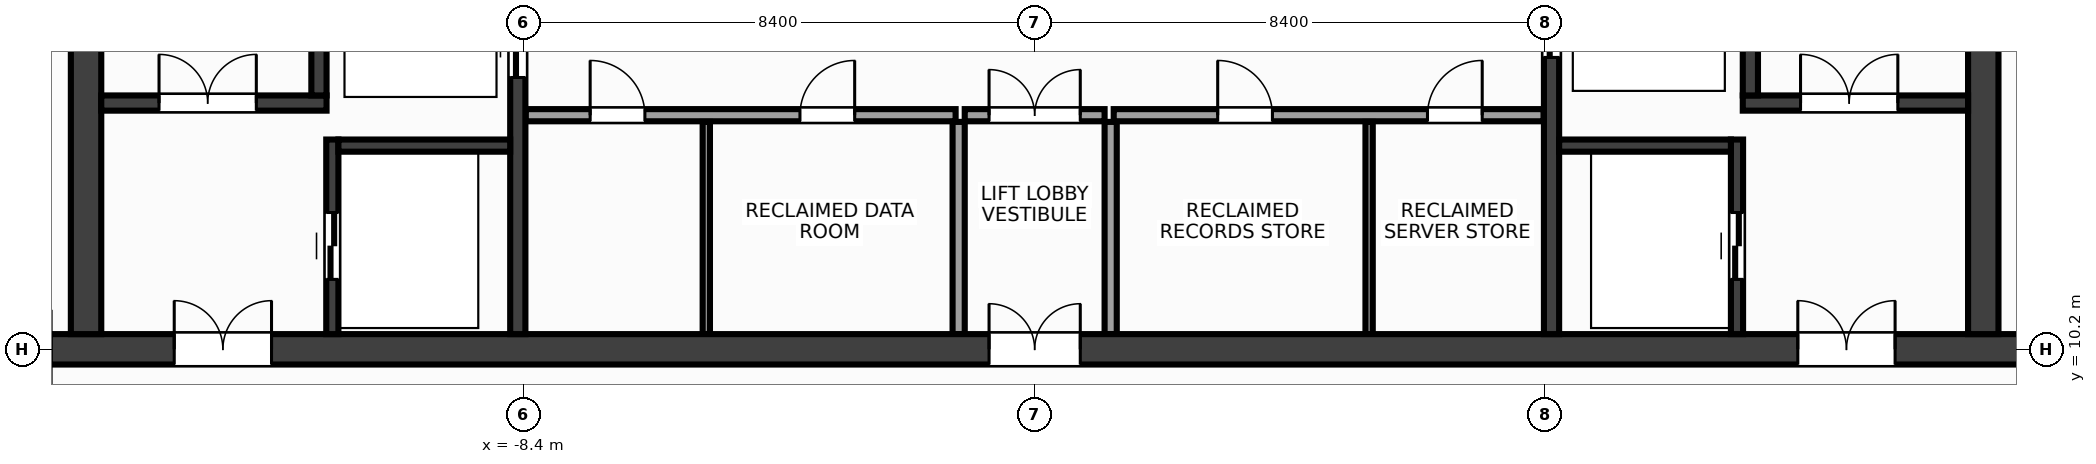
"""IFC4 building model, lengths in metres.
Left out: names, types, materials, properties, quantities, classifications, styles, units other than length and angle.
Written with IfcOpenShell. Run it as: python <this file> out.ifc"""

import sys

from ifc_helpers import new_model, si_unit, direction, frame, frame_2d, origin, place, context, subcontext, project, spatial, rectangle, extrude, source, transform, mapped, element, fill, save


model = new_model("IFC4")
c1 = context("Model", 3, precision=1e-05, world=origin(), true_north=direction((0.0, 1.0)))
c2 = subcontext(c1, "Body", "Model", "MODEL_VIEW")
j1 = project(units=[si_unit("LENGTHUNIT", "METRE"), si_unit("PLANEANGLEUNIT", "RADIAN")], contexts=[c1])
p1 = place(None, origin())
s1 = spatial("IfcSite", under=j1, at=p1, CompositionType="ELEMENT")
p2 = place(p1, origin())
s2 = spatial("IfcBuilding", under=s1, at=p2, CompositionType="ELEMENT")
p3 = place(p2, frame((0.0, 0.0, 286.4)))
s3 = spatial("IfcBuildingStorey", under=s2, at=p3, CompositionType="ELEMENT", Elevation=286.4)
m1 = source(origin(), c2, "Body", "SweptSolid", [
    extrude(rectangle(XDim=32.4, YDim=0.5, at=frame_2d((16.2, 0.0))), origin(), (0.0, 0.0, 1.0), 3.6),
])
p4 = place(p3, frame((-16.2, 10.2, 0.0), z_axis=(0.0, 0.0, 1.0), x_axis=(1.0, 0.0, 0.0)))
e1 = element("IfcWall", 1, at=p4, inside=s3, PredefinedType="SHEAR", context=c2, shape_type="MappedRepresentation", body=[
    mapped(m1, transform((0.0, 0.0, 0.0), x_axis=(1.0, 0.0, 0.0), y_axis=(0.0, 1.0, 0.0), z_axis=(0.0, 0.0, 1.0), scale=1.0)),
])
p5 = place(p4, frame((2.05, 0.0, 0.0)))
e2 = element("IfcOpeningElement", 2, at=p5, cuts=e1, PredefinedType="OPENING", context=c2, shape_type="SweptSolid", body=[
    extrude(rectangle(XDim=1.6, YDim=2.15, at=frame_2d((0.8, 1.075))), frame((0.0, 0.262, 0.0), z_axis=(0.0, -1.0, 0.0), x_axis=(1.0, 0.0, 0.0)), (0.0, 0.0, 1.0), 0.524),
])
p6 = place(p4, frame((28.75, 0.0, 0.0)))
e3 = element("IfcOpeningElement", 3, at=p6, cuts=e1, PredefinedType="OPENING", context=c2, shape_type="SweptSolid", body=[
    extrude(rectangle(XDim=1.6, YDim=2.15, at=frame_2d((0.8, 1.075))), frame((0.0, 0.262, 0.0), z_axis=(0.0, -1.0, 0.0), x_axis=(1.0, 0.0, 0.0)), (0.0, 0.0, 1.0), 0.524),
])
p7 = place(p4, frame((15.45, 0.0, 0.0)))
e4 = element("IfcOpeningElement", 4, at=p7, cuts=e1, PredefinedType="OPENING", context=c2, shape_type="SweptSolid", body=[
    extrude(rectangle(XDim=1.5, YDim=2.2, at=frame_2d((0.75, 1.1))), frame((0.0, 0.262, 0.0), z_axis=(0.0, -1.0, 0.0), x_axis=(1.0, 0.0, 0.0)), (0.0, 0.0, 1.0), 0.524),
])
m2 = source(origin(), c2, "Body", "SweptSolid", [
    extrude(rectangle(XDim=13.1, YDim=0.5, at=frame_2d((6.55, 0.0))), origin(), (0.0, 0.0, 1.0), 3.6),
])
for number, where, z_axis, x_axis in (
    (5, (-15.6, 10.45, 0.0), (0.0, 0.0, 1.0), (0.0, 1.0, 0.0)),
    (6, (15.6, 10.45, 0.0), (0.0, 0.0, 1.0), (0.0, 1.0, 0.0)),
):
    element("IfcWall", number, at=place(p3, frame(where, z_axis=z_axis, x_axis=x_axis)), inside=s3, PredefinedType="SHEAR", context=c2, shape_type="MappedRepresentation", body=[
        mapped(m2, transform((0.0, 0.0, 0.0), x_axis=(1.0, 0.0, 0.0), y_axis=(0.0, 1.0, 0.0), z_axis=(0.0, 0.0, 1.0), scale=1.0)),
    ])
m3 = source(origin(), c2, "Body", "SweptSolid", [
    extrude(rectangle(XDim=13.1, YDim=0.25, at=frame_2d((6.55, 0.0))), origin(), (0.0, 0.0, 1.0), 3.6),
])
p8 = place(p3, frame((-8.5, 10.45, 0.0), z_axis=(0.0, 0.0, 1.0), x_axis=(0.0, 1.0, 0.0)))
e7 = element("IfcWall", 7, at=p8, inside=s3, PredefinedType="SHEAR", context=c2, shape_type="MappedRepresentation", body=[
    mapped(m3, transform((0.0, 0.0, 0.0), x_axis=(1.0, 0.0, 0.0), y_axis=(0.0, 1.0, 0.0), z_axis=(0.0, 0.0, 1.0), scale=1.0)),
])
p9 = place(p8, frame((4.22, 0.0, 0.0)))
e8 = element("IfcOpeningElement", 8, at=p9, cuts=e7, PredefinedType="OPENING", context=c2, shape_type="SweptSolid", body=[
    extrude(rectangle(XDim=1.1, YDim=2.15, at=frame_2d((0.55, 1.075))), frame((0.0, 0.137, 0.0), z_axis=(0.0, -1.0, 0.0), x_axis=(1.0, 0.0, 0.0)), (0.0, 0.0, 1.0), 0.274),
])
p10 = place(p8, frame((6.14, 0.0, 0.0)))
e9 = element("IfcOpeningElement", 9, at=p10, cuts=e7, PredefinedType="OPENING", context=c2, shape_type="SweptSolid", body=[
    extrude(rectangle(XDim=1.1, YDim=2.15, at=frame_2d((0.55, 1.075))), frame((0.0, 0.137, 0.0), z_axis=(0.0, -1.0, 0.0), x_axis=(1.0, 0.0, 0.0)), (0.0, 0.0, 1.0), 0.274),
])
p11 = place(p8, frame((8.06, 0.0, 0.0)))
e10 = element("IfcOpeningElement", 10, at=p11, cuts=e7, PredefinedType="OPENING", context=c2, shape_type="SweptSolid", body=[
    extrude(rectangle(XDim=1.1, YDim=2.15, at=frame_2d((0.55, 1.075))), frame((0.0, 0.137, 0.0), z_axis=(0.0, -1.0, 0.0), x_axis=(1.0, 0.0, 0.0)), (0.0, 0.0, 1.0), 0.274),
])
p12 = place(p3, frame((8.5, 10.45, 0.0), z_axis=(0.0, 0.0, 1.0), x_axis=(0.0, 1.0, 0.0)))
e11 = element("IfcWall", 11, at=p12, inside=s3, PredefinedType="SHEAR", context=c2, shape_type="MappedRepresentation", body=[
    mapped(m3, transform((0.0, 0.0, 0.0), x_axis=(1.0, 0.0, 0.0), y_axis=(0.0, 1.0, 0.0), z_axis=(0.0, 0.0, 1.0), scale=1.0)),
])
p13 = place(p12, frame((4.55, 0.0, 0.0)))
e12 = element("IfcOpeningElement", 12, at=p13, cuts=e11, PredefinedType="OPENING", context=c2, shape_type="SweptSolid", body=[
    extrude(rectangle(XDim=1.1, YDim=2.15, at=frame_2d((0.55, 1.075))), frame((0.0, 0.137, 0.0), z_axis=(0.0, -1.0, 0.0), x_axis=(1.0, 0.0, 0.0)), (0.0, 0.0, 1.0), 0.274),
])
p14 = place(p12, frame((7.1, 0.0, 0.0)))
e13 = element("IfcOpeningElement", 13, at=p14, cuts=e11, PredefinedType="OPENING", context=c2, shape_type="SweptSolid", body=[
    extrude(rectangle(XDim=1.1, YDim=2.15, at=frame_2d((0.55, 1.075))), frame((0.0, 0.137, 0.0), z_axis=(0.0, -1.0, 0.0), x_axis=(1.0, 0.0, 0.0)), (0.0, 0.0, 1.0), 0.274),
])
p15 = place(p12, frame((10.0, 0.0, 0.0)))
e14 = element("IfcOpeningElement", 14, at=p15, cuts=e11, PredefinedType="OPENING", context=c2, shape_type="SweptSolid", body=[
    extrude(rectangle(XDim=0.95, YDim=2.15, at=frame_2d((0.475, 1.075))), frame((0.0, 0.137, 0.0), z_axis=(0.0, -1.0, 0.0), x_axis=(1.0, 0.0, 0.0)), (0.0, 0.0, 1.0), 0.274),
])
m4 = source(origin(), c2, "Body", "SweptSolid", [
    extrude(rectangle(XDim=3.705, YDim=0.25, at=frame_2d((1.853, 0.0))), origin(), (0.0, 0.0, 1.0), 3.6),
])
p16 = place(p3, frame((-15.35, 14.25, 0.0), z_axis=(0.0, 0.0, 1.0), x_axis=(1.0, 0.0, 0.0)))
e15 = element("IfcWall", 15, at=p16, inside=s3, PredefinedType="SHEAR", context=c2, shape_type="MappedRepresentation", body=[
    mapped(m4, transform((0.0, 0.0, 0.0), x_axis=(1.0, 0.0, 0.0), y_axis=(0.0, 1.0, 0.0), z_axis=(0.0, 0.0, 1.0), scale=1.0)),
])
p17 = place(p16, frame((0.95, 0.0, 0.0)))
e16 = element("IfcOpeningElement", 16, at=p17, cuts=e15, PredefinedType="OPENING", context=c2, shape_type="SweptSolid", body=[
    extrude(rectangle(XDim=1.6, YDim=2.15, at=frame_2d((0.8, 1.075))), frame((0.0, 0.137, 0.0), z_axis=(0.0, -1.0, 0.0), x_axis=(1.0, 0.0, 0.0)), (0.0, 0.0, 1.0), 0.274),
])
m5 = source(origin(), c2, "Body", "SweptSolid", [
    extrude(rectangle(XDim=9.175, YDim=0.25, at=frame_2d((4.587, 0.0))), origin(), (0.0, 0.0, 1.0), 3.6),
])
p18 = place(p3, frame((-11.77, 14.375, 0.0), z_axis=(0.0, 0.0, 1.0), x_axis=(0.0, 1.0, 0.0)))
e17 = element("IfcWall", 17, at=p18, inside=s3, PredefinedType="SHEAR", context=c2, shape_type="MappedRepresentation", body=[
    mapped(m5, transform((0.0, 0.0, 0.0), x_axis=(1.0, 0.0, 0.0), y_axis=(0.0, 1.0, 0.0), z_axis=(0.0, 0.0, 1.0), scale=1.0)),
])
p19 = place(p3, frame((11.645, 14.25, 0.0), z_axis=(0.0, 0.0, 1.0), x_axis=(1.0, 0.0, 0.0)))
e18 = element("IfcWall", 18, at=p19, inside=s3, PredefinedType="SHEAR", context=c2, shape_type="MappedRepresentation", body=[
    mapped(m4, transform((0.0, 0.0, 0.0), x_axis=(1.0, 0.0, 0.0), y_axis=(0.0, 1.0, 0.0), z_axis=(0.0, 0.0, 1.0), scale=1.0)),
])
p20 = place(p19, frame((0.95, 0.0, 0.0)))
e19 = element("IfcOpeningElement", 19, at=p20, cuts=e18, PredefinedType="OPENING", context=c2, shape_type="SweptSolid", body=[
    extrude(rectangle(XDim=1.6, YDim=2.15, at=frame_2d((0.8, 1.075))), frame((0.0, 0.137, 0.0), z_axis=(0.0, -1.0, 0.0), x_axis=(1.0, 0.0, 0.0)), (0.0, 0.0, 1.0), 0.274),
])
p21 = place(p3, frame((11.77, 14.375, 0.0), z_axis=(0.0, 0.0, 1.0), x_axis=(0.0, 1.0, 0.0)))
e20 = element("IfcWall", 20, at=p21, inside=s3, PredefinedType="SHEAR", context=c2, shape_type="MappedRepresentation", body=[
    mapped(m5, transform((0.0, 0.0, 0.0), x_axis=(1.0, 0.0, 0.0), y_axis=(0.0, 1.0, 0.0), z_axis=(0.0, 0.0, 1.0), scale=1.0)),
])
m6 = source(origin(), c2, "Body", "SweptSolid", [
    extrude(rectangle(XDim=3.2, YDim=0.2, at=frame_2d((1.6, 0.0))), origin(), (0.0, 0.0, 1.0), 3.6),
])
p22 = place(p3, frame((-11.55, 10.45, 0.0), z_axis=(0.0, 0.0, 1.0), x_axis=(0.0, 1.0, 0.0)))
e21 = element("IfcWall", 21, at=p22, inside=s3, PredefinedType="SHEAR", context=c2, shape_type="MappedRepresentation", body=[
    mapped(m6, transform((0.0, 0.0, 0.0), x_axis=(1.0, 0.0, 0.0), y_axis=(0.0, 1.0, 0.0), z_axis=(0.0, 0.0, 1.0), scale=1.0)),
])
p23 = place(p22, frame((0.9, 0.0, 0.0)))
e22 = element("IfcOpeningElement", 22, at=p23, cuts=e21, PredefinedType="OPENING", context=c2, shape_type="SweptSolid", body=[
    extrude(rectangle(XDim=1.1, YDim=2.15, at=frame_2d((0.55, 1.075))), frame((0.0, 0.112, 0.0), z_axis=(0.0, -1.0, 0.0), x_axis=(1.0, 0.0, 0.0)), (0.0, 0.0, 1.0), 0.224),
])
m7 = source(origin(), c2, "Body", "SweptSolid", [
    extrude(rectangle(XDim=2.825, YDim=0.2, at=frame_2d((1.413, 0.0))), origin(), (0.0, 0.0, 1.0), 3.6),
])
p24 = place(p3, frame((-11.45, 13.55, 0.0), z_axis=(0.0, 0.0, 1.0), x_axis=(1.0, 0.0, 0.0)))
e23 = element("IfcWall", 23, at=p24, inside=s3, PredefinedType="SHEAR", context=c2, shape_type="MappedRepresentation", body=[
    mapped(m7, transform((0.0, 0.0, 0.0), x_axis=(1.0, 0.0, 0.0), y_axis=(0.0, 1.0, 0.0), z_axis=(0.0, 0.0, 1.0), scale=1.0)),
])
p25 = place(p3, frame((11.55, 10.45, 0.0), z_axis=(0.0, 0.0, 1.0), x_axis=(0.0, 1.0, 0.0)))
e24 = element("IfcWall", 24, at=p25, inside=s3, PredefinedType="SHEAR", context=c2, shape_type="MappedRepresentation", body=[
    mapped(m6, transform((0.0, 0.0, 0.0), x_axis=(1.0, 0.0, 0.0), y_axis=(0.0, 1.0, 0.0), z_axis=(0.0, 0.0, 1.0), scale=1.0)),
])
p26 = place(p25, frame((0.9, 0.0, 0.0)))
e25 = element("IfcOpeningElement", 25, at=p26, cuts=e24, PredefinedType="OPENING", context=c2, shape_type="SweptSolid", body=[
    extrude(rectangle(XDim=1.1, YDim=2.15, at=frame_2d((0.55, 1.075))), frame((0.0, 0.112, 0.0), z_axis=(0.0, -1.0, 0.0), x_axis=(1.0, 0.0, 0.0)), (0.0, 0.0, 1.0), 0.224),
])
p27 = place(p3, frame((8.625, 13.55, 0.0), z_axis=(0.0, 0.0, 1.0), x_axis=(1.0, 0.0, 0.0)))
e26 = element("IfcWall", 26, at=p27, inside=s3, PredefinedType="SHEAR", context=c2, shape_type="MappedRepresentation", body=[
    mapped(m7, transform((0.0, 0.0, 0.0), x_axis=(1.0, 0.0, 0.0), y_axis=(0.0, 1.0, 0.0), z_axis=(0.0, 0.0, 1.0), scale=1.0)),
])
m8 = source(origin(), c2, "Body", "SweptSolid", [
    extrude(rectangle(XDim=7.07, YDim=0.2, at=frame_2d((3.535, 0.0))), origin(), (0.0, 0.0, 1.0), 3.37),
])
p28 = place(p3, frame((-8.37, 14.05, 0.0), z_axis=(0.0, 0.0, 1.0), x_axis=(1.0, 0.0, 0.0)))
e27 = element("IfcWall", 27, at=p28, inside=s3, PredefinedType="PARTITIONING", context=c2, shape_type="MappedRepresentation", body=[
    mapped(m8, transform((0.0, 0.0, 0.0), x_axis=(1.0, 0.0, 0.0), y_axis=(0.0, 1.0, 0.0), z_axis=(0.0, 0.0, 1.0), scale=1.0)),
])
p29 = place(p28, frame((1.06, 0.0, 0.0)))
e28 = element("IfcOpeningElement", 28, at=p29, cuts=e27, PredefinedType="OPENING", context=c2, shape_type="SweptSolid", body=[
    extrude(rectangle(XDim=0.9, YDim=2.15, at=frame_2d((0.45, 1.075))), frame((0.0, 0.112, 0.0), z_axis=(0.0, -1.0, 0.0), x_axis=(1.0, 0.0, 0.0)), (0.0, 0.0, 1.0), 0.224),
])
p30 = place(p28, frame((4.51, 0.0, 0.0)))
e29 = element("IfcOpeningElement", 29, at=p30, cuts=e27, PredefinedType="OPENING", context=c2, shape_type="SweptSolid", body=[
    extrude(rectangle(XDim=0.9, YDim=2.15, at=frame_2d((0.45, 1.075))), frame((0.0, 0.112, 0.0), z_axis=(0.0, -1.0, 0.0), x_axis=(1.0, 0.0, 0.0)), (0.0, 0.0, 1.0), 0.224),
])
p31 = place(p3, frame((1.3, 14.05, 0.0), z_axis=(0.0, 0.0, 1.0), x_axis=(1.0, 0.0, 0.0)))
e30 = element("IfcWall", 30, at=p31, inside=s3, PredefinedType="PARTITIONING", context=c2, shape_type="MappedRepresentation", body=[
    mapped(m8, transform((0.0, 0.0, 0.0), x_axis=(1.0, 0.0, 0.0), y_axis=(0.0, 1.0, 0.0), z_axis=(0.0, 0.0, 1.0), scale=1.0)),
])
p32 = place(p31, frame((1.71, 0.0, 0.0)))
e31 = element("IfcOpeningElement", 31, at=p32, cuts=e30, PredefinedType="OPENING", context=c2, shape_type="SweptSolid", body=[
    extrude(rectangle(XDim=0.9, YDim=2.15, at=frame_2d((0.45, 1.075))), frame((0.0, 0.112, 0.0), z_axis=(0.0, -1.0, 0.0), x_axis=(1.0, 0.0, 0.0)), (0.0, 0.0, 1.0), 0.224),
])
p33 = place(p31, frame((5.16, 0.0, 0.0)))
e32 = element("IfcOpeningElement", 32, at=p33, cuts=e30, PredefinedType="OPENING", context=c2, shape_type="SweptSolid", body=[
    extrude(rectangle(XDim=0.9, YDim=2.15, at=frame_2d((0.45, 1.075))), frame((0.0, 0.112, 0.0), z_axis=(0.0, -1.0, 0.0), x_axis=(1.0, 0.0, 0.0)), (0.0, 0.0, 1.0), 0.224),
])
m9 = source(origin(), c2, "Body", "SweptSolid", [
    extrude(rectangle(XDim=3.49, YDim=0.2, at=frame_2d((1.745, 0.0))), origin(), (0.0, 0.0, 1.0), 3.37),
])
for number, where, z_axis, x_axis in (
    (33, (-1.25, 10.45, 0.0), (0.0, 0.0, 1.0), (0.0, 1.0, 0.0)),
    (34, (1.25, 10.45, 0.0), (0.0, 0.0, 1.0), (0.0, 1.0, 0.0)),
):
    element("IfcWall", number, at=place(p3, frame(where, z_axis=z_axis, x_axis=x_axis)), inside=s3, PredefinedType="PARTITIONING", context=c2, shape_type="MappedRepresentation", body=[
        mapped(m9, transform((0.0, 0.0, 0.0), x_axis=(1.0, 0.0, 0.0), y_axis=(0.0, 1.0, 0.0), z_axis=(0.0, 0.0, 1.0), scale=1.0)),
    ])
m10 = source(origin(), c2, "Body", "SweptSolid", [
    extrude(rectangle(XDim=2.3, YDim=0.2, at=frame_2d((1.15, 0.0))), origin(), (0.0, 0.0, 1.0), 3.37),
])
p34 = place(p3, frame((-1.15, 14.05, 0.0), z_axis=(0.0, 0.0, 1.0), x_axis=(1.0, 0.0, 0.0)))
e35 = element("IfcWall", 35, at=p34, inside=s3, PredefinedType="PARTITIONING", context=c2, shape_type="MappedRepresentation", body=[
    mapped(m10, transform((0.0, 0.0, 0.0), x_axis=(1.0, 0.0, 0.0), y_axis=(0.0, 1.0, 0.0), z_axis=(0.0, 0.0, 1.0), scale=1.0)),
])
p35 = place(p34, frame((0.4, 0.0, 0.0)))
e36 = element("IfcOpeningElement", 36, at=p35, cuts=e35, PredefinedType="OPENING", context=c2, shape_type="SweptSolid", body=[
    extrude(rectangle(XDim=1.5, YDim=2.2, at=frame_2d((0.75, 1.1))), frame((0.0, 0.112, 0.0), z_axis=(0.0, -1.0, 0.0), x_axis=(1.0, 0.0, 0.0)), (0.0, 0.0, 1.0), 0.224),
])
m11 = source(origin(), c2, "Body", "SweptSolid", [
    extrude(rectangle(XDim=3.49, YDim=0.12, at=frame_2d((1.745, 0.0))), origin(), (0.0, 0.0, 1.0), 3.37),
])
for number, where, z_axis, x_axis in (
    (37, (-5.4, 10.45, 0.0), (0.0, 0.0, 1.0), (0.0, 1.0, 0.0)),
    (38, (5.5, 10.45, 0.0), (0.0, 0.0, 1.0), (0.0, 1.0, 0.0)),
):
    element("IfcWall", number, at=place(p3, frame(where, z_axis=z_axis, x_axis=x_axis)), inside=s3, PredefinedType="PARTITIONING", context=c2, shape_type="MappedRepresentation", body=[
        mapped(m11, transform((0.0, 0.0, 0.0), x_axis=(1.0, 0.0, 0.0), y_axis=(0.0, 1.0, 0.0), z_axis=(0.0, 0.0, 1.0), scale=1.0)),
    ])
m12 = source(origin(), c2, "Body", "SweptSolid", [
    extrude(rectangle(XDim=1.6, YDim=2.15, at=frame_2d((0.8, 1.075))), frame((0.0, 0.025, 0.0), z_axis=(0.0, -1.0, 0.0), x_axis=(1.0, 0.0, 0.0)), (0.0, 0.0, 1.0), 0.05),
])
p36 = place(p17, origin())
e39 = element("IfcDoor", 39, at=p36, inside=s3, OperationType="DOUBLE_DOOR_SINGLE_SWING", PredefinedType="DOOR", context=c2, shape_type="MappedRepresentation", body=[
    mapped(m12, transform((0.0, 0.0, 0.0), x_axis=(1.0, 0.0, 0.0), y_axis=(0.0, 1.0, 0.0), z_axis=(0.0, 0.0, 1.0), scale=1.0)),
])
fill(e16, e39)
p37 = place(p20, origin())
e40 = element("IfcDoor", 40, at=p37, inside=s3, OperationType="DOUBLE_DOOR_SINGLE_SWING", PredefinedType="DOOR", context=c2, shape_type="MappedRepresentation", body=[
    mapped(m12, transform((0.0, 0.0, 0.0), x_axis=(1.0, 0.0, 0.0), y_axis=(0.0, 1.0, 0.0), z_axis=(0.0, 0.0, 1.0), scale=1.0)),
])
fill(e19, e40)
p38 = place(p5, origin())
e41 = element("IfcDoor", 41, at=p38, inside=s3, OperationType="DOUBLE_DOOR_SINGLE_SWING", PredefinedType="DOOR", context=c2, shape_type="MappedRepresentation", body=[
    mapped(m12, transform((0.0, 0.0, 0.0), x_axis=(1.0, 0.0, 0.0), y_axis=(0.0, 1.0, 0.0), z_axis=(0.0, 0.0, 1.0), scale=1.0)),
])
fill(e2, e41)
p39 = place(p6, origin())
e42 = element("IfcDoor", 42, at=p39, inside=s3, OperationType="DOUBLE_DOOR_SINGLE_SWING", PredefinedType="DOOR", context=c2, shape_type="MappedRepresentation", body=[
    mapped(m12, transform((0.0, 0.0, 0.0), x_axis=(1.0, 0.0, 0.0), y_axis=(0.0, 1.0, 0.0), z_axis=(0.0, 0.0, 1.0), scale=1.0)),
])
fill(e3, e42)
m13 = source(origin(), c2, "Body", "SweptSolid", [
    extrude(rectangle(XDim=1.1, YDim=2.15, at=frame_2d((0.55, 1.075))), frame((0.0, 0.025, 0.0), z_axis=(0.0, -1.0, 0.0), x_axis=(1.0, 0.0, 0.0)), (0.0, 0.0, 1.0), 0.05),
])
p40 = place(p23, origin())
e43 = element("IfcDoor", 43, at=p40, inside=s3, OperationType="DOUBLE_DOOR_SLIDING", PredefinedType="DOOR", context=c2, shape_type="MappedRepresentation", body=[
    mapped(m13, transform((0.0, 0.0, 0.0), x_axis=(1.0, 0.0, 0.0), y_axis=(0.0, 1.0, 0.0), z_axis=(0.0, 0.0, 1.0), scale=1.0)),
])
fill(e22, e43)
p41 = place(p26, origin())
e44 = element("IfcDoor", 44, at=p41, inside=s3, OperationType="DOUBLE_DOOR_SLIDING", PredefinedType="DOOR", context=c2, shape_type="MappedRepresentation", body=[
    mapped(m13, transform((0.0, 0.0, 0.0), x_axis=(1.0, 0.0, 0.0), y_axis=(0.0, 1.0, 0.0), z_axis=(0.0, 0.0, 1.0), scale=1.0)),
])
fill(e25, e44)
p42 = place(p9, origin())
e45 = element("IfcDoor", 45, at=p42, inside=s3, OperationType="DOUBLE_DOOR_SLIDING", PredefinedType="DOOR", context=c2, shape_type="MappedRepresentation", body=[
    mapped(m13, transform((0.0, 0.0, 0.0), x_axis=(1.0, 0.0, 0.0), y_axis=(0.0, 1.0, 0.0), z_axis=(0.0, 0.0, 1.0), scale=1.0)),
])
fill(e8, e45)
p43 = place(p13, origin())
e46 = element("IfcDoor", 46, at=p43, inside=s3, OperationType="DOUBLE_DOOR_SLIDING", PredefinedType="DOOR", context=c2, shape_type="MappedRepresentation", body=[
    mapped(m13, transform((0.0, 0.0, 0.0), x_axis=(1.0, 0.0, 0.0), y_axis=(0.0, 1.0, 0.0), z_axis=(0.0, 0.0, 1.0), scale=1.0)),
])
fill(e12, e46)
m14 = source(origin(), c2, "Body", "SweptSolid", [
    extrude(rectangle(XDim=0.9, YDim=2.15, at=frame_2d((0.45, 1.075))), frame((0.0, 0.025, 0.0), z_axis=(0.0, -1.0, 0.0), x_axis=(1.0, 0.0, 0.0)), (0.0, 0.0, 1.0), 0.05),
])
p44 = place(p29, origin())
e47 = element("IfcDoor", 47, at=p44, inside=s3, OperationType="SINGLE_SWING_LEFT", PredefinedType="DOOR", context=c2, shape_type="MappedRepresentation", body=[
    mapped(m14, transform((0.0, 0.0, 0.0), x_axis=(1.0, 0.0, 0.0), y_axis=(0.0, 1.0, 0.0), z_axis=(0.0, 0.0, 1.0), scale=1.0)),
])
fill(e28, e47)
p45 = place(p30, origin())
e48 = element("IfcDoor", 48, at=p45, inside=s3, OperationType="SINGLE_SWING_RIGHT", PredefinedType="DOOR", context=c2, shape_type="MappedRepresentation", body=[
    mapped(m14, transform((0.0, 0.0, 0.0), x_axis=(1.0, 0.0, 0.0), y_axis=(0.0, 1.0, 0.0), z_axis=(0.0, 0.0, 1.0), scale=1.0)),
])
fill(e29, e48)
p46 = place(p32, origin())
e49 = element("IfcDoor", 49, at=p46, inside=s3, OperationType="SINGLE_SWING_LEFT", PredefinedType="DOOR", context=c2, shape_type="MappedRepresentation", body=[
    mapped(m14, transform((0.0, 0.0, 0.0), x_axis=(1.0, 0.0, 0.0), y_axis=(0.0, 1.0, 0.0), z_axis=(0.0, 0.0, 1.0), scale=1.0)),
])
fill(e31, e49)
p47 = place(p33, origin())
e50 = element("IfcDoor", 50, at=p47, inside=s3, OperationType="SINGLE_SWING_RIGHT", PredefinedType="DOOR", context=c2, shape_type="MappedRepresentation", body=[
    mapped(m14, transform((0.0, 0.0, 0.0), x_axis=(1.0, 0.0, 0.0), y_axis=(0.0, 1.0, 0.0), z_axis=(0.0, 0.0, 1.0), scale=1.0)),
])
fill(e32, e50)
m15 = source(origin(), c2, "Body", "SweptSolid", [
    extrude(rectangle(XDim=1.5, YDim=2.2, at=frame_2d((0.75, 1.1))), frame((0.0, 0.025, 0.0), z_axis=(0.0, -1.0, 0.0), x_axis=(1.0, 0.0, 0.0)), (0.0, 0.0, 1.0), 0.05),
])
p48 = place(p35, origin())
e51 = element("IfcDoor", 51, at=p48, inside=s3, OperationType="DOUBLE_DOOR_SINGLE_SWING", PredefinedType="DOOR", context=c2, shape_type="MappedRepresentation", body=[
    mapped(m15, transform((0.0, 0.0, 0.0), x_axis=(1.0, 0.0, 0.0), y_axis=(0.0, 1.0, 0.0), z_axis=(0.0, 0.0, 1.0), scale=1.0)),
])
fill(e36, e51)
p49 = place(p7, origin())
e52 = element("IfcDoor", 52, at=p49, inside=s3, OperationType="DOUBLE_DOOR_SINGLE_SWING", PredefinedType="DOOR", context=c2, shape_type="MappedRepresentation", body=[
    mapped(m15, transform((0.0, 0.0, 0.0), x_axis=(1.0, 0.0, 0.0), y_axis=(0.0, 1.0, 0.0), z_axis=(0.0, 0.0, 1.0), scale=1.0)),
])
fill(e4, e52)
save(model, sys.argv[1])
